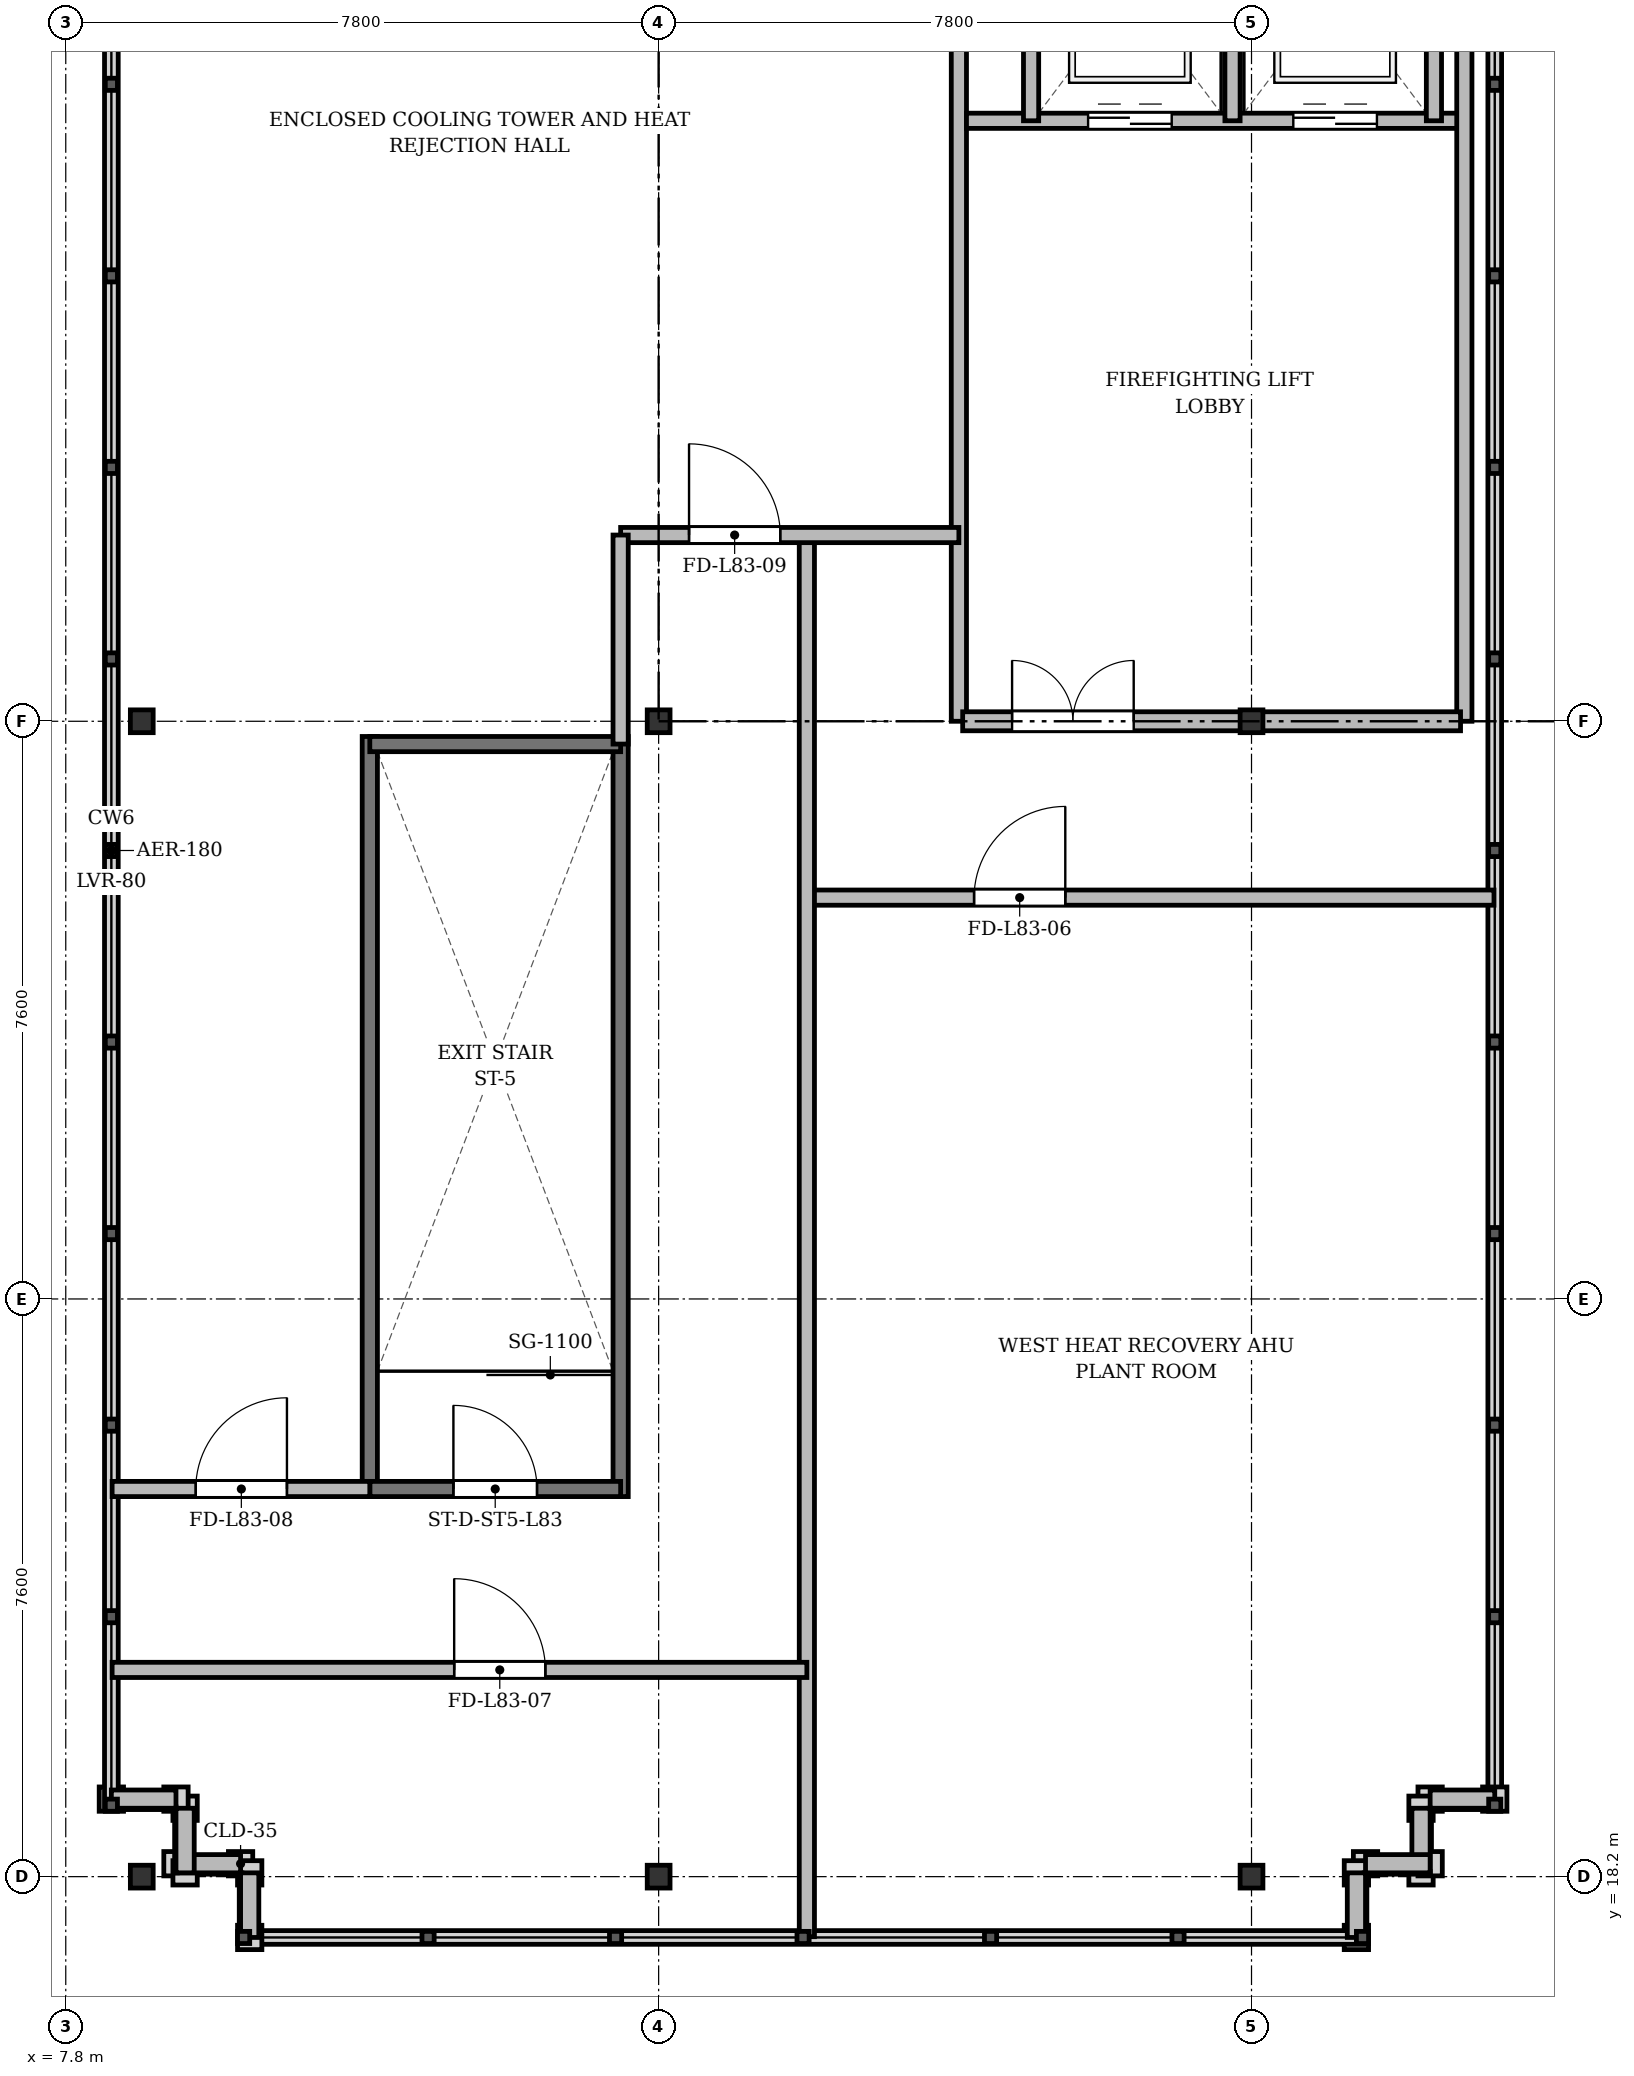
"""IFC4 building model, lengths in metres.
Left out: names, types, materials, properties, quantities, classifications, styles, units other than length and angle.
Written with IfcOpenShell. Run it as: python <this file> out.ifc"""

import sys

from ifc_helpers import new_model, si_unit, direction, frame, frame_2d, origin, origin_2d, place, context, subcontext, project, spatial, rectangle, i_section, extrude, source, transform, mapped, element, fill, save


model = new_model("IFC4")
c1 = context("Model", 3, precision=1e-05, world=origin(), true_north=direction((0.0, 1.0)))
c2 = subcontext(c1, "Body", "Model", "MODEL_VIEW")
j1 = project(units=[si_unit("LENGTHUNIT", "METRE"), si_unit("PLANEANGLEUNIT", "RADIAN")], contexts=[c1])
p1 = place(None, origin())
s1 = spatial("IfcSite", under=j1, at=p1, CompositionType="ELEMENT")
p2 = place(p1, origin())
s2 = spatial("IfcBuilding", under=s1, at=p2, CompositionType="ELEMENT")
p3 = place(p2, frame((0.0, 0.0, 320.9)))
s3 = spatial("IfcBuildingStorey", under=s2, at=p3, CompositionType="ELEMENT", Elevation=320.9)
m1 = source(origin(), c2, "Body", "SweptSolid", [
    extrude(i_section(OverallWidth=0.3, OverallDepth=0.3, WebThickness=0.015, FlangeThickness=0.024, at=origin_2d()), origin(), (0.0, 0.0, 1.0), 4.2),
])
for number, where, z_axis, x_axis in (
    (1, (8.8, 18.2, 0.0), (0.0, 0.0, 1.0), (1.0, 0.0, 0.0)),
    (2, (8.8, 33.4, 0.0), (0.0, 0.0, 1.0), (1.0, 0.0, 0.0)),
    (3, (15.6, 18.2, 0.0), (0.0, 0.0, 1.0), (1.0, 0.0, 0.0)),
    (4, (15.6, 33.4, 0.0), (0.0, 0.0, 1.0), (1.0, 0.0, 0.0)),
    (5, (23.4, 18.2, 0.0), (0.0, 0.0, 1.0), (1.0, 0.0, 0.0)),
    (6, (23.4, 33.4, 0.0), (0.0, 0.0, 1.0), (1.0, 0.0, 0.0)),
):
    element("IfcColumn", number, at=place(p3, frame(where, z_axis=z_axis, x_axis=x_axis)), inside=s3, PredefinedType="COLUMN", context=c2, shape_type="MappedRepresentation", body=[
        mapped(m1, transform((0.0, 0.0, 0.0), x_axis=(1.0, 0.0, 0.0), y_axis=(0.0, 1.0, 0.0), z_axis=(0.0, 0.0, 1.0), scale=1.0)),
    ])
for number, where, z_axis, x_axis in (
    (7, (10.1, 18.37, 0.0), (0.0, 0.0, 1.0), (-1.0, 0.0, 0.0)),
    (8, (9.37, 18.25, 0.0), (0.0, 0.0, 1.0), (0.0, 1.0, 0.0)),
    (9, (9.25, 19.22, 0.0), (0.0, 0.0, 1.0), (-1.0, 0.0, 0.0)),
):
    element("IfcWall", number, at=place(p3, frame(where, z_axis=z_axis, x_axis=x_axis)), inside=s3, PredefinedType="SOLIDWALL", context=c2, shape_type="SweptSolid", body=[
        extrude(rectangle(XDim=0.85, YDim=0.24, at=frame_2d((0.425, 0.0))), origin(), (0.0, 0.0, 1.0), 3.4),
    ])
p4 = place(p3, frame((26.6, 19.22, 0.0), z_axis=(0.0, 0.0, 1.0), x_axis=(-1.0, 0.0, 0.0)))
e10 = element("IfcWall", 10, at=p4, inside=s3, PredefinedType="SOLIDWALL", context=c2, shape_type="SweptSolid", body=[
    extrude(rectangle(XDim=0.85, YDim=0.24, at=frame_2d((0.425, 0.0))), origin(), (0.0, 0.0, 1.0), 3.9),
])
for number, where, z_axis, x_axis in (
    (11, (25.63, 19.1, 0.0), (0.0, 0.0, 1.0), (0.0, -1.0, 0.0)),
    (12, (25.75, 18.37, 0.0), (0.0, 0.0, 1.0), (-1.0, 0.0, 0.0)),
    (13, (24.78, 18.25, 0.0), (0.0, 0.0, 1.0), (0.0, -1.0, 0.0)),
    (14, (10.22, 17.4, 0.0), (0.0, 0.0, 1.0), (0.0, 1.0, 0.0)),
):
    element("IfcWall", number, at=place(p3, frame(where, z_axis=z_axis, x_axis=x_axis)), inside=s3, PredefinedType="SOLIDWALL", context=c2, shape_type="SweptSolid", body=[
        extrude(rectangle(XDim=0.85, YDim=0.24, at=frame_2d((0.425, 0.0))), origin(), (0.0, 0.0, 1.0), 3.4),
    ])
for number, where, z_axis, x_axis in (
    (15, (11.8, 23.2, 0.0), (0.0, 0.0, 1.0), (0.0, 1.0, 0.0)),
    (16, (15.1, 23.2, 0.0), (0.0, 0.0, 1.0), (0.0, 1.0, 0.0)),
):
    element("IfcWall", number, at=place(p3, frame(where, z_axis=z_axis, x_axis=x_axis)), inside=s3, PredefinedType="SHEAR", context=c2, shape_type="SweptSolid", body=[
        extrude(rectangle(XDim=10.0, YDim=0.2, at=frame_2d((5.0, 0.0))), origin(), (0.0, 0.0, 1.0), 3.9),
    ])
p5 = place(p3, frame((11.8, 33.1, 0.0), z_axis=(0.0, 0.0, 1.0), x_axis=(1.0, 0.0, 0.0)))
e17 = element("IfcWall", 17, at=p5, inside=s3, PredefinedType="SHEAR", context=c2, shape_type="SweptSolid", body=[
    extrude(rectangle(XDim=3.3, YDim=0.2, at=frame_2d((1.65, 0.0))), origin(), (0.0, 0.0, 1.0), 3.9),
])
p6 = place(p3, frame((11.8, 23.3, 0.0), z_axis=(0.0, 0.0, 1.0), x_axis=(1.0, 0.0, 0.0)))
e18 = element("IfcWall", 18, at=p6, inside=s3, PredefinedType="SHEAR", context=c2, shape_type="SweptSolid", body=[
    extrude(rectangle(XDim=3.3, YDim=0.2, at=frame_2d((1.65, 0.0))), origin(), (0.0, 0.0, 1.0), 3.9),
])
p7 = place(p6, frame((1.1, 0.0, 0.0)))
e19 = element("IfcOpeningElement", 19, at=p7, cuts=e18, PredefinedType="OPENING", context=c2, shape_type="SweptSolid", body=[
    extrude(rectangle(XDim=1.1, YDim=2.15, at=frame_2d((0.55, 1.075))), frame((0.0, 0.11, 0.0), z_axis=(0.0, -1.0, 0.0), x_axis=(1.0, 0.0, 0.0)), (0.0, 0.0, 1.0), 0.22),
])
p8 = place(p3, frame((19.55, 33.4, 0.0), z_axis=(0.0, 0.0, 1.0), x_axis=(0.0, 1.0, 0.0)))
e20 = element("IfcWall", 20, at=p8, inside=s3, PredefinedType="PARTITIONING", context=c2, shape_type="SweptSolid", body=[
    extrude(rectangle(XDim=11.3, YDim=0.2, at=frame_2d((5.65, 0.0))), origin(), (0.0, 0.0, 1.0), 3.4),
])
p9 = place(p3, frame((19.65, 41.3, 0.0), z_axis=(0.0, 0.0, 1.0), x_axis=(1.0, 0.0, 0.0)))
e21 = element("IfcWall", 21, at=p9, inside=s3, PredefinedType="SOLIDWALL", context=c2, shape_type="SweptSolid", body=[
    extrude(rectangle(XDim=6.5, YDim=0.2, at=frame_2d((3.25, 0.0))), origin(), (0.0, 0.0, 1.0), 3.4),
])
p10 = place(p9, frame((1.6, 0.0, 0.0)))
e22 = element("IfcOpeningElement", 22, at=p10, cuts=e21, PredefinedType="OPENING", context=c2, shape_type="SweptSolid", body=[
    extrude(rectangle(XDim=1.1, YDim=2.15, at=frame_2d((0.55, 1.075))), frame((0.0, 0.11, 0.0), z_axis=(0.0, -1.0, 0.0), x_axis=(1.0, 0.0, 0.0)), (0.0, 0.0, 1.0), 0.22),
])
p11 = place(p9, frame((4.3, 0.0, 0.0)))
e23 = element("IfcOpeningElement", 23, at=p11, cuts=e21, PredefinedType="OPENING", context=c2, shape_type="SweptSolid", body=[
    extrude(rectangle(XDim=1.1, YDim=2.15, at=frame_2d((0.55, 1.075))), frame((0.0, 0.11, 0.0), z_axis=(0.0, -1.0, 0.0), x_axis=(1.0, 0.0, 0.0)), (0.0, 0.0, 1.0), 0.22),
])
for number, where, z_axis, x_axis in (
    (24, (20.5, 41.3, 0.0), (0.0, 0.0, 1.0), (0.0, 1.0, 0.0)),
    (25, (23.15, 41.3, 0.0), (0.0, 0.0, 1.0), (0.0, 1.0, 0.0)),
):
    element("IfcWall", number, at=place(p3, frame(where, z_axis=z_axis, x_axis=x_axis)), inside=s3, PredefinedType="SOLIDWALL", context=c2, shape_type="SweptSolid", body=[
        extrude(rectangle(XDim=3.4, YDim=0.2, at=frame_2d((1.7, 0.0))), origin(), (0.0, 0.0, 1.0), 3.9),
    ])
p12 = place(p3, frame((25.8, 41.3, 0.0), z_axis=(0.0, 0.0, 1.0), x_axis=(0.0, 1.0, 0.0)))
e26 = element("IfcWall", 26, at=p12, inside=s3, PredefinedType="SOLIDWALL", context=c2, shape_type="SweptSolid", body=[
    extrude(rectangle(XDim=2.86, YDim=0.2, at=frame_2d((1.43, 0.0))), origin(), (0.0, 0.0, 1.0), 3.9),
])
p13 = place(p3, frame((26.2, 33.4, 0.0), z_axis=(0.0, 0.0, 1.0), x_axis=(0.0, 1.0, 0.0)))
e27 = element("IfcWall", 27, at=p13, inside=s3, PredefinedType="SOLIDWALL", context=c2, shape_type="SweptSolid", body=[
    extrude(rectangle(XDim=10.76, YDim=0.2, at=frame_2d((5.38, 0.0))), origin(), (0.0, 0.0, 1.0), 3.4),
])
p14 = place(p3, frame((19.6, 33.4, 0.0), z_axis=(0.0, 0.0, 1.0), x_axis=(1.0, 0.0, 0.0)))
e28 = element("IfcWall", 28, at=p14, inside=s3, PredefinedType="PARTITIONING", context=c2, shape_type="SweptSolid", body=[
    extrude(rectangle(XDim=6.55, YDim=0.25, at=frame_2d((3.275, 0.0))), origin(), (0.0, 0.0, 1.0), 3.4),
])
p15 = place(p14, frame((0.65, 0.0, 0.0)))
e29 = element("IfcOpeningElement", 29, at=p15, cuts=e28, PredefinedType="OPENING", context=c2, shape_type="SweptSolid", body=[
    extrude(rectangle(XDim=1.6, YDim=2.2, at=frame_2d((0.8, 1.1))), frame((0.0, 0.135, 0.0), z_axis=(0.0, -1.0, 0.0), x_axis=(1.0, 0.0, 0.0)), (0.0, 0.0, 1.0), 0.27),
])
p16 = place(p3, frame((17.55, 31.08, 0.0), z_axis=(0.0, 0.0, 1.0), x_axis=(1.0, 0.0, 0.0)))
e30 = element("IfcWall", 30, at=p16, inside=s3, PredefinedType="PARTITIONING", context=c2, shape_type="SweptSolid", body=[
    extrude(rectangle(XDim=9.04, YDim=0.2, at=frame_2d((4.52, 0.0))), origin(), (0.0, 0.0, 1.0), 3.4),
])
p17 = place(p16, frame((2.2, 0.0, 0.0)))
e31 = element("IfcOpeningElement", 31, at=p17, cuts=e30, PredefinedType="OPENING", context=c2, shape_type="SweptSolid", body=[
    extrude(rectangle(XDim=1.2, YDim=2.15, at=frame_2d((0.6, 1.075))), frame((0.0, 0.11, 0.0), z_axis=(0.0, -1.0, 0.0), x_axis=(1.0, 0.0, 0.0)), (0.0, 0.0, 1.0), 0.22),
])
p18 = place(p3, frame((17.55, 17.41, 0.0), z_axis=(0.0, 0.0, 1.0), x_axis=(0.0, 1.0, 0.0)))
e32 = element("IfcWall", 32, at=p18, inside=s3, PredefinedType="PARTITIONING", context=c2, shape_type="SweptSolid", body=[
    extrude(rectangle(XDim=18.44, YDim=0.2, at=frame_2d((9.22, 0.0))), origin(), (0.0, 0.0, 1.0), 3.4),
])
p19 = place(p3, frame((8.41, 20.92, 0.0), z_axis=(0.0, 0.0, 1.0), x_axis=(1.0, 0.0, 0.0)))
e33 = element("IfcWall", 33, at=p19, inside=s3, PredefinedType="PARTITIONING", context=c2, shape_type="SweptSolid", body=[
    extrude(rectangle(XDim=9.14, YDim=0.2, at=frame_2d((4.57, 0.0))), origin(), (0.0, 0.0, 1.0), 3.4),
])
p20 = place(p19, frame((4.5, 0.0, 0.0)))
e34 = element("IfcOpeningElement", 34, at=p20, cuts=e33, PredefinedType="OPENING", context=c2, shape_type="SweptSolid", body=[
    extrude(rectangle(XDim=1.2, YDim=2.15, at=frame_2d((0.6, 1.075))), frame((0.0, 0.11, 0.0), z_axis=(0.0, -1.0, 0.0), x_axis=(1.0, 0.0, 0.0)), (0.0, 0.0, 1.0), 0.22),
])
p21 = place(p3, frame((8.41, 23.3, 0.0), z_axis=(0.0, 0.0, 1.0), x_axis=(1.0, 0.0, 0.0)))
e35 = element("IfcWall", 35, at=p21, inside=s3, PredefinedType="PARTITIONING", context=c2, shape_type="SweptSolid", body=[
    extrude(rectangle(XDim=3.39, YDim=0.2, at=frame_2d((1.695, 0.0))), origin(), (0.0, 0.0, 1.0), 3.4),
])
p22 = place(p21, frame((1.1, 0.0, 0.0)))
e36 = element("IfcOpeningElement", 36, at=p22, cuts=e35, PredefinedType="OPENING", context=c2, shape_type="SweptSolid", body=[
    extrude(rectangle(XDim=1.2, YDim=2.15, at=frame_2d((0.6, 1.075))), frame((0.0, 0.11, 0.0), z_axis=(0.0, -1.0, 0.0), x_axis=(1.0, 0.0, 0.0)), (0.0, 0.0, 1.0), 0.22),
])
p23 = place(p3, frame((15.1, 35.85, 0.0), z_axis=(0.0, 0.0, 1.0), x_axis=(1.0, 0.0, 0.0)))
e37 = element("IfcWall", 37, at=p23, inside=s3, PredefinedType="PARTITIONING", context=c2, shape_type="SweptSolid", body=[
    extrude(rectangle(XDim=4.45, YDim=0.2, at=frame_2d((2.225, 0.0))), origin(), (0.0, 0.0, 1.0), 3.4),
])
p24 = place(p23, frame((0.9, 0.0, 0.0)))
e38 = element("IfcOpeningElement", 38, at=p24, cuts=e37, PredefinedType="OPENING", context=c2, shape_type="SweptSolid", body=[
    extrude(rectangle(XDim=1.2, YDim=2.15, at=frame_2d((0.6, 1.075))), frame((0.0, 0.11, 0.0), z_axis=(0.0, -1.0, 0.0), x_axis=(1.0, 0.0, 0.0)), (0.0, 0.0, 1.0), 0.22),
])
p25 = place(p3, frame((15.1, 33.1, 0.0), z_axis=(0.0, 0.0, 1.0), x_axis=(0.0, 1.0, 0.0)))
e39 = element("IfcWall", 39, at=p25, inside=s3, PredefinedType="PARTITIONING", context=c2, shape_type="SweptSolid", body=[
    extrude(rectangle(XDim=2.75, YDim=0.2, at=frame_2d((1.375, 0.0))), origin(), (0.0, 0.0, 1.0), 3.4),
])
m2 = source(origin(), c2, "Body", "SweptSolid", [
    extrude(rectangle(XDim=1.1, YDim=2.15, at=frame_2d((0.55, 1.075))), frame((0.0, 0.025, 0.0), z_axis=(0.0, -1.0, 0.0), x_axis=(1.0, 0.0, 0.0)), (0.0, 0.0, 1.0), 0.05),
])
p26 = place(p7, origin())
e40 = element("IfcDoor", 40, at=p26, inside=s3, OperationType="SINGLE_SWING_LEFT", PredefinedType="DOOR", context=c2, shape_type="MappedRepresentation", body=[
    mapped(m2, transform((0.0, 0.0, 0.0), x_axis=(1.0, 0.0, 0.0), y_axis=(0.0, 1.0, 0.0), z_axis=(0.0, 0.0, 1.0), scale=1.0)),
])
fill(e19, e40)
p27 = place(p10, origin())
e41 = element("IfcDoor", 41, at=p27, inside=s3, OperationType="DOUBLE_DOOR_SLIDING", PredefinedType="DOOR", context=c2, shape_type="MappedRepresentation", body=[
    mapped(m2, transform((0.0, 0.0, 0.0), x_axis=(1.0, 0.0, 0.0), y_axis=(0.0, 1.0, 0.0), z_axis=(0.0, 0.0, 1.0), scale=1.0)),
])
fill(e22, e41)
p28 = place(p11, origin())
e42 = element("IfcDoor", 42, at=p28, inside=s3, OperationType="DOUBLE_DOOR_SLIDING", PredefinedType="DOOR", context=c2, shape_type="MappedRepresentation", body=[
    mapped(m2, transform((0.0, 0.0, 0.0), x_axis=(1.0, 0.0, 0.0), y_axis=(0.0, 1.0, 0.0), z_axis=(0.0, 0.0, 1.0), scale=1.0)),
])
fill(e23, e42)
m3 = source(origin(), c2, "Body", "SweptSolid", [
    extrude(rectangle(XDim=1.6, YDim=2.2, at=frame_2d((0.8, 1.1))), frame((0.0, 0.025, 0.0), z_axis=(0.0, -1.0, 0.0), x_axis=(1.0, 0.0, 0.0)), (0.0, 0.0, 1.0), 0.05),
])
p29 = place(p15, origin())
e43 = element("IfcDoor", 43, at=p29, inside=s3, OperationType="DOUBLE_DOOR_SINGLE_SWING", PredefinedType="DOOR", context=c2, shape_type="MappedRepresentation", body=[
    mapped(m3, transform((0.0, 0.0, 0.0), x_axis=(1.0, 0.0, 0.0), y_axis=(0.0, 1.0, 0.0), z_axis=(0.0, 0.0, 1.0), scale=1.0)),
])
fill(e29, e43)
m4 = source(origin(), c2, "Body", "SweptSolid", [
    extrude(rectangle(XDim=1.2, YDim=2.15, at=frame_2d((0.6, 1.075))), frame((0.0, 0.025, 0.0), z_axis=(0.0, -1.0, 0.0), x_axis=(1.0, 0.0, 0.0)), (0.0, 0.0, 1.0), 0.05),
])
p30 = place(p17, origin())
e44 = element("IfcDoor", 44, at=p30, inside=s3, OperationType="SINGLE_SWING_RIGHT", PredefinedType="DOOR", context=c2, shape_type="MappedRepresentation", body=[
    mapped(m4, transform((0.0, 0.0, 0.0), x_axis=(1.0, 0.0, 0.0), y_axis=(0.0, 1.0, 0.0), z_axis=(0.0, 0.0, 1.0), scale=1.0)),
])
fill(e31, e44)
p31 = place(p20, origin())
e45 = element("IfcDoor", 45, at=p31, inside=s3, OperationType="SINGLE_SWING_LEFT", PredefinedType="DOOR", context=c2, shape_type="MappedRepresentation", body=[
    mapped(m4, transform((0.0, 0.0, 0.0), x_axis=(1.0, 0.0, 0.0), y_axis=(0.0, 1.0, 0.0), z_axis=(0.0, 0.0, 1.0), scale=1.0)),
])
fill(e34, e45)
p32 = place(p22, origin())
e46 = element("IfcDoor", 46, at=p32, inside=s3, OperationType="SINGLE_SWING_RIGHT", PredefinedType="DOOR", context=c2, shape_type="MappedRepresentation", body=[
    mapped(m4, transform((0.0, 0.0, 0.0), x_axis=(1.0, 0.0, 0.0), y_axis=(0.0, 1.0, 0.0), z_axis=(0.0, 0.0, 1.0), scale=1.0)),
])
fill(e36, e46)
p33 = place(p24, origin())
e47 = element("IfcDoor", 47, at=p33, inside=s3, OperationType="SINGLE_SWING_LEFT", PredefinedType="DOOR", context=c2, shape_type="MappedRepresentation", body=[
    mapped(m4, transform((0.0, 0.0, 0.0), x_axis=(1.0, 0.0, 0.0), y_axis=(0.0, 1.0, 0.0), z_axis=(0.0, 0.0, 1.0), scale=1.0)),
])
fill(e38, e47)
save(model, sys.argv[1])
